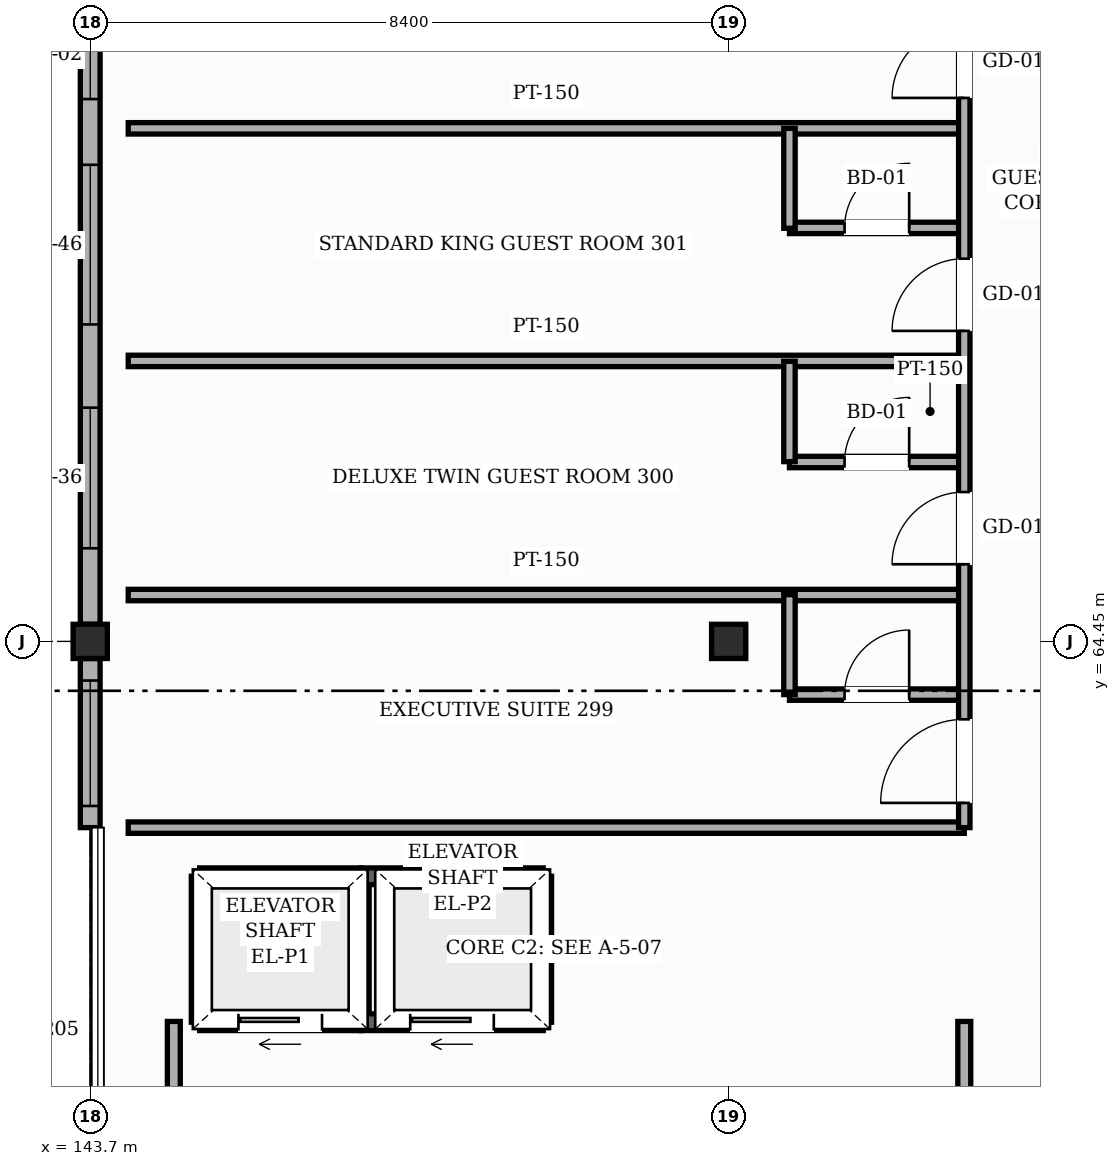
"""IFC4 building model, lengths in metres.
Left out: names, types, materials, properties, quantities, classifications, styles, units other than length and angle.
Written with IfcOpenShell. Run it as: python <this file> out.ifc"""

import sys

from ifc_helpers import new_model, si_unit, direction, frame, frame_2d, origin, origin_2d, place, context, subcontext, project, spatial, rectangle, hollow_rectangle, extrude, element, fill, save


model = new_model("IFC4")
c1 = context("Model", 3, precision=1e-05, world=origin(), true_north=direction((0.0, 1.0)))
c2 = subcontext(c1, "Body", "Model", "MODEL_VIEW")
j1 = project(units=[si_unit("LENGTHUNIT", "METRE"), si_unit("PLANEANGLEUNIT", "RADIAN")], contexts=[c1])
p1 = place(None, origin())
s1 = spatial("IfcSite", under=j1, at=p1, CompositionType="ELEMENT")
p2 = place(p1, origin())
s2 = spatial("IfcBuilding", under=s1, at=p2, CompositionType="ELEMENT")
p3 = place(p2, frame((0.0, 0.0, 42.6)))
s3 = spatial("IfcBuildingStorey", under=s2, at=p3, CompositionType="ELEMENT", Elevation=42.6)
for number, where, z_axis, x_axis in (
    (1, (143.7, 64.45, 0.0), (0.0, 0.0, 1.0), (1.0, 0.0, 0.0)),
    (2, (152.1, 64.45, 0.0), (0.0, 0.0, 1.0), (1.0, 0.0, 0.0)),
):
    element("IfcColumn", number, at=place(p3, frame(where, z_axis=z_axis, x_axis=x_axis)), inside=s3, PredefinedType="COLUMN", context=c2, shape_type="SweptSolid", body=[
        extrude(hollow_rectangle(XDim=0.45, YDim=0.45, WallThickness=0.019, InnerFilletRadius=0.019, OuterFilletRadius=0.038, at=origin_2d()), origin(), (0.0, 0.0, 1.0), 3.6),
    ])
p4 = place(p3, frame((143.7, 62.0, 0.0), z_axis=(0.0, 0.0, 1.0), x_axis=(0.0, 1.0, 0.0)))
e3 = element("IfcWall", 3, at=p4, inside=s3, PredefinedType="SOLIDWALL", context=c2, shape_type="SweptSolid", body=[
    extrude(rectangle(XDim=2.225, YDim=0.26, at=frame_2d((1.113, 0.0))), origin(), (0.0, 0.0, 1.0), 2.805),
])
p5 = place(p4, frame((0.285, 0.0, 0.85)))
e4 = element("IfcOpeningElement", 4, at=p5, cuts=e3, PredefinedType="OPENING", context=c2, shape_type="SweptSolid", body=[
    extrude(rectangle(XDim=1.65, YDim=1.35, at=frame_2d((0.825, 0.675))), frame((0.0, 0.14, 0.0), z_axis=(0.0, -1.0, 0.0), x_axis=(1.0, 0.0, 0.0)), (0.0, 0.0, 1.0), 0.28),
])
p6 = place(p3, frame((143.7, 64.675, 0.0), z_axis=(0.0, 0.0, 1.0), x_axis=(0.0, 1.0, 0.0)))
e5 = element("IfcWall", 5, at=p6, inside=s3, PredefinedType="SOLIDWALL", context=c2, shape_type="SweptSolid", body=[
    extrude(rectangle(XDim=8.45, YDim=0.26, at=frame_2d((4.225, 0.0))), origin(), (0.0, 0.0, 1.0), 2.655),
])
p7 = place(p6, frame((1.0, 0.0, 0.85)))
e6 = element("IfcOpeningElement", 6, at=p7, cuts=e5, PredefinedType="OPENING", context=c2, shape_type="SweptSolid", body=[
    extrude(rectangle(XDim=1.85, YDim=1.35, at=frame_2d((0.925, 0.675))), frame((0.0, 0.14, 0.0), z_axis=(0.0, -1.0, 0.0), x_axis=(1.0, 0.0, 0.0)), (0.0, 0.0, 1.0), 0.28),
])
p8 = place(p6, frame((3.945, 0.0, 0.85)))
e7 = element("IfcOpeningElement", 7, at=p8, cuts=e5, PredefinedType="OPENING", context=c2, shape_type="SweptSolid", body=[
    extrude(rectangle(XDim=2.1, YDim=1.35, at=frame_2d((1.05, 0.675))), frame((0.0, 0.14, 0.0), z_axis=(0.0, -1.0, 0.0), x_axis=(1.0, 0.0, 0.0)), (0.0, 0.0, 1.0), 0.28),
])
p9 = place(p6, frame((6.91, 0.0, 0.85)))
e8 = element("IfcOpeningElement", 8, at=p9, cuts=e5, PredefinedType="OPENING", context=c2, shape_type="SweptSolid", body=[
    extrude(rectangle(XDim=1.15, YDim=1.5, at=frame_2d((0.575, 0.75))), frame((0.0, 0.14, 0.0), z_axis=(0.0, -1.0, 0.0), x_axis=(1.0, 0.0, 0.0)), (0.0, 0.0, 1.0), 0.28),
])
p10 = place(p3, frame((145.14, 61.36, 0.0), z_axis=(0.0, 0.0, 1.0), x_axis=(1.0, 0.0, 0.0)))
e9 = element("IfcWall", 9, at=p10, inside=s3, PredefinedType="SHEAR", context=c2, shape_type="SweptSolid", body=[
    extrude(rectangle(XDim=2.12, YDim=0.22, at=frame_2d((1.06, 0.0))), origin(), (0.0, 0.0, 1.0), 3.38),
])
p11 = place(p3, frame((145.14, 59.44, 0.0), z_axis=(0.0, 0.0, 1.0), x_axis=(1.0, 0.0, 0.0)))
e10 = element("IfcWall", 10, at=p11, inside=s3, PredefinedType="SHEAR", context=c2, shape_type="SweptSolid", body=[
    extrude(rectangle(XDim=2.12, YDim=0.22, at=frame_2d((1.06, 0.0))), origin(), (0.0, 0.0, 1.0), 3.38),
])
p12 = place(p11, frame((0.51, 0.0, 0.0)))
e11 = element("IfcOpeningElement", 11, at=p12, cuts=e10, PredefinedType="OPENING", context=c2, shape_type="SweptSolid", body=[
    extrude(rectangle(XDim=1.1, YDim=2.2, at=frame_2d((0.55, 1.1))), frame((0.0, 0.12, 0.0), z_axis=(0.0, -1.0, 0.0), x_axis=(1.0, 0.0, 0.0)), (0.0, 0.0, 1.0), 0.24),
])
for number, where, z_axis, x_axis in (
    (12, (147.26, 59.44, 0.0), (0.0, 0.0, 1.0), (0.0, 1.0, 0.0)),
    (13, (145.14, 59.44, 0.0), (0.0, 0.0, 1.0), (0.0, 1.0, 0.0)),
):
    element("IfcWall", number, at=place(p3, frame(where, z_axis=z_axis, x_axis=x_axis)), inside=s3, PredefinedType="SHEAR", context=c2, shape_type="SweptSolid", body=[
        extrude(rectangle(XDim=1.92, YDim=0.22, at=frame_2d((0.96, 0.0))), origin(), (0.0, 0.0, 1.0), 3.38),
    ])
p13 = place(p3, frame((147.26, 61.36, 0.0), z_axis=(0.0, 0.0, 1.0), x_axis=(1.0, 0.0, 0.0)))
e14 = element("IfcWall", 14, at=p13, inside=s3, PredefinedType="SHEAR", context=c2, shape_type="SweptSolid", body=[
    extrude(rectangle(XDim=2.4, YDim=0.22, at=frame_2d((1.2, 0.0))), origin(), (0.0, 0.0, 1.0), 3.38),
])
p14 = place(p3, frame((147.26, 59.44, 0.0), z_axis=(0.0, 0.0, 1.0), x_axis=(1.0, 0.0, 0.0)))
e15 = element("IfcWall", 15, at=p14, inside=s3, PredefinedType="SHEAR", context=c2, shape_type="SweptSolid", body=[
    extrude(rectangle(XDim=2.4, YDim=0.22, at=frame_2d((1.2, 0.0))), origin(), (0.0, 0.0, 1.0), 3.38),
])
p15 = place(p14, frame((0.65, 0.0, 0.0)))
e16 = element("IfcOpeningElement", 16, at=p15, cuts=e15, PredefinedType="OPENING", context=c2, shape_type="SweptSolid", body=[
    extrude(rectangle(XDim=1.1, YDim=2.2, at=frame_2d((0.55, 1.1))), frame((0.0, 0.12, 0.0), z_axis=(0.0, -1.0, 0.0), x_axis=(1.0, 0.0, 0.0)), (0.0, 0.0, 1.0), 0.24),
])
p16 = place(p3, frame((149.66, 59.44, 0.0), z_axis=(0.0, 0.0, 1.0), x_axis=(0.0, 1.0, 0.0)))
e17 = element("IfcWall", 17, at=p16, inside=s3, PredefinedType="SHEAR", context=c2, shape_type="SweptSolid", body=[
    extrude(rectangle(XDim=1.92, YDim=0.22, at=frame_2d((0.96, 0.0))), origin(), (0.0, 0.0, 1.0), 3.38),
])
p17 = place(p3, frame((144.2, 62.0, 0.0), z_axis=(0.0, 0.0, 1.0), x_axis=(1.0, 0.0, 0.0)))
e18 = element("IfcWall", 18, at=p17, inside=s3, PredefinedType="PARTITIONING", context=c2, shape_type="SweptSolid", body=[
    extrude(rectangle(XDim=11.0, YDim=0.15, at=frame_2d((5.5, 0.0))), origin(), (0.0, 0.0, 1.0), 3.365),
])
p18 = place(p3, frame((152.9, 63.75, 0.0), z_axis=(0.0, 0.0, 1.0), x_axis=(1.0, 0.0, 0.0)))
e19 = element("IfcWall", 19, at=p18, inside=s3, PredefinedType="PARTITIONING", context=c2, shape_type="SweptSolid", body=[
    extrude(rectangle(XDim=2.3, YDim=0.15, at=frame_2d((1.15, 0.0))), origin(), (0.0, 0.0, 1.0), 3.365),
])
p19 = place(p18, frame((0.725, 0.0, 0.0)))
e20 = element("IfcOpeningElement", 20, at=p19, cuts=e19, PredefinedType="OPENING", context=c2, shape_type="SweptSolid", body=[
    extrude(rectangle(XDim=0.85, YDim=2.1, at=frame_2d((0.425, 1.05))), frame((0.0, 0.085, 0.0), z_axis=(0.0, -1.0, 0.0), x_axis=(1.0, 0.0, 0.0)), (0.0, 0.0, 1.0), 0.17),
])
p20 = place(p3, frame((144.2, 65.06, 0.0), z_axis=(0.0, 0.0, 1.0), x_axis=(1.0, 0.0, 0.0)))
e21 = element("IfcWall", 21, at=p20, inside=s3, PredefinedType="PARTITIONING", context=c2, shape_type="SweptSolid", body=[
    extrude(rectangle(XDim=11.0, YDim=0.15, at=frame_2d((5.5, 0.0))), origin(), (0.0, 0.0, 1.0), 3.365),
])
p21 = place(p3, frame((152.9, 66.81, 0.0), z_axis=(0.0, 0.0, 1.0), x_axis=(1.0, 0.0, 0.0)))
e22 = element("IfcWall", 22, at=p21, inside=s3, PredefinedType="PARTITIONING", context=c2, shape_type="SweptSolid", body=[
    extrude(rectangle(XDim=2.3, YDim=0.15, at=frame_2d((1.15, 0.0))), origin(), (0.0, 0.0, 1.0), 3.365),
])
p22 = place(p21, frame((0.725, 0.0, 0.0)))
e23 = element("IfcOpeningElement", 23, at=p22, cuts=e22, PredefinedType="OPENING", context=c2, shape_type="SweptSolid", body=[
    extrude(rectangle(XDim=0.85, YDim=2.1, at=frame_2d((0.425, 1.05))), frame((0.0, 0.085, 0.0), z_axis=(0.0, -1.0, 0.0), x_axis=(1.0, 0.0, 0.0)), (0.0, 0.0, 1.0), 0.17),
])
p23 = place(p3, frame((144.2, 68.14, 0.0), z_axis=(0.0, 0.0, 1.0), x_axis=(1.0, 0.0, 0.0)))
e24 = element("IfcWall", 24, at=p23, inside=s3, PredefinedType="PARTITIONING", context=c2, shape_type="SweptSolid", body=[
    extrude(rectangle(XDim=11.0, YDim=0.15, at=frame_2d((5.5, 0.0))), origin(), (0.0, 0.0, 1.0), 3.365),
])
p24 = place(p3, frame((152.9, 69.89, 0.0), z_axis=(0.0, 0.0, 1.0), x_axis=(1.0, 0.0, 0.0)))
e25 = element("IfcWall", 25, at=p24, inside=s3, PredefinedType="PARTITIONING", context=c2, shape_type="SweptSolid", body=[
    extrude(rectangle(XDim=2.3, YDim=0.15, at=frame_2d((1.15, 0.0))), origin(), (0.0, 0.0, 1.0), 3.365),
])
p25 = place(p24, frame((0.725, 0.0, 0.0)))
e26 = element("IfcOpeningElement", 26, at=p25, cuts=e25, PredefinedType="OPENING", context=c2, shape_type="SweptSolid", body=[
    extrude(rectangle(XDim=0.85, YDim=2.1, at=frame_2d((0.425, 1.05))), frame((0.0, 0.085, 0.0), z_axis=(0.0, -1.0, 0.0), x_axis=(1.0, 0.0, 0.0)), (0.0, 0.0, 1.0), 0.17),
])
p26 = place(p3, frame((144.2, 71.2, 0.0), z_axis=(0.0, 0.0, 1.0), x_axis=(1.0, 0.0, 0.0)))
e27 = element("IfcWall", 27, at=p26, inside=s3, PredefinedType="PARTITIONING", context=c2, shape_type="SweptSolid", body=[
    extrude(rectangle(XDim=11.0, YDim=0.15, at=frame_2d((5.5, 0.0))), origin(), (0.0, 0.0, 1.0), 3.365),
])
p27 = place(p3, frame((144.8, 53.0, 0.0), z_axis=(0.0, 0.0, 1.0), x_axis=(0.0, 1.0, 0.0)))
e28 = element("IfcWall", 28, at=p27, inside=s3, PredefinedType="PARTITIONING", context=c2, shape_type="SweptSolid", body=[
    extrude(rectangle(XDim=6.45, YDim=0.17, at=frame_2d((3.225, 0.0))), origin(), (0.0, 0.0, 1.0), 3.365),
])
p28 = place(p3, frame((152.9, 63.75, 0.0), z_axis=(0.0, 0.0, 1.0), x_axis=(0.0, 1.0, 0.0)))
e29 = element("IfcWall", 29, at=p28, inside=s3, PredefinedType="PARTITIONING", context=c2, shape_type="SweptSolid", body=[
    extrude(rectangle(XDim=1.315, YDim=0.15, at=frame_2d((0.657, 0.0))), origin(), (0.0, 0.0, 1.0), 3.365),
])
p29 = place(p3, frame((152.9, 66.815, 0.0), z_axis=(0.0, 0.0, 1.0), x_axis=(0.0, 1.0, 0.0)))
e30 = element("IfcWall", 30, at=p29, inside=s3, PredefinedType="PARTITIONING", context=c2, shape_type="SweptSolid", body=[
    extrude(rectangle(XDim=1.32, YDim=0.15, at=frame_2d((0.66, 0.0))), origin(), (0.0, 0.0, 1.0), 3.365),
])
p30 = place(p3, frame((152.9, 69.885, 0.0), z_axis=(0.0, 0.0, 1.0), x_axis=(0.0, 1.0, 0.0)))
e31 = element("IfcWall", 31, at=p30, inside=s3, PredefinedType="PARTITIONING", context=c2, shape_type="SweptSolid", body=[
    extrude(rectangle(XDim=1.315, YDim=0.15, at=frame_2d((0.657, 0.0))), origin(), (0.0, 0.0, 1.0), 3.365),
])
p31 = place(p3, frame((155.2, 53.0, 0.0), z_axis=(0.0, 0.0, 1.0), x_axis=(0.0, 1.0, 0.0)))
e32 = element("IfcWall", 32, at=p31, inside=s3, PredefinedType="PARTITIONING", context=c2, shape_type="SweptSolid", body=[
    extrude(rectangle(XDim=6.45, YDim=0.17, at=frame_2d((3.225, 0.0))), origin(), (0.0, 0.0, 1.0), 3.365),
])
p32 = place(p31, frame((2.625, 0.0, 0.0)))
e33 = element("IfcOpeningElement", 33, at=p32, cuts=e32, PredefinedType="OPENING", context=c2, shape_type="SweptSolid", body=[
    extrude(rectangle(XDim=1.2, YDim=2.2, at=frame_2d((0.6, 1.1))), frame((0.0, 0.095, 0.0), z_axis=(0.0, -1.0, 0.0), x_axis=(1.0, 0.0, 0.0)), (0.0, 0.0, 1.0), 0.19),
])
p33 = place(p3, frame((155.2, 62.0, 0.0), z_axis=(0.0, 0.0, 1.0), x_axis=(0.0, 1.0, 0.0)))
e34 = element("IfcWall", 34, at=p33, inside=s3, PredefinedType="PARTITIONING", context=c2, shape_type="SweptSolid", body=[
    extrude(rectangle(XDim=18.4, YDim=0.15, at=frame_2d((9.2, 0.0))), origin(), (0.0, 0.0, 1.0), 3.365),
])
p34 = place(p33, frame((0.325, 0.0, 0.0)))
e35 = element("IfcOpeningElement", 35, at=p34, cuts=e34, PredefinedType="OPENING", context=c2, shape_type="SweptSolid", body=[
    extrude(rectangle(XDim=1.1, YDim=2.2, at=frame_2d((0.55, 1.1))), frame((0.0, 0.085, 0.0), z_axis=(0.0, -1.0, 0.0), x_axis=(1.0, 0.0, 0.0)), (0.0, 0.0, 1.0), 0.17),
])
p35 = place(p33, frame((3.465, 0.0, 0.0)))
e36 = element("IfcOpeningElement", 36, at=p35, cuts=e34, PredefinedType="OPENING", context=c2, shape_type="SweptSolid", body=[
    extrude(rectangle(XDim=0.95, YDim=2.15, at=frame_2d((0.475, 1.075))), frame((0.0, 0.085, 0.0), z_axis=(0.0, -1.0, 0.0), x_axis=(1.0, 0.0, 0.0)), (0.0, 0.0, 1.0), 0.17),
])
p36 = place(p33, frame((6.535, 0.0, 0.0)))
e37 = element("IfcOpeningElement", 37, at=p36, cuts=e34, PredefinedType="OPENING", context=c2, shape_type="SweptSolid", body=[
    extrude(rectangle(XDim=0.95, YDim=2.15, at=frame_2d((0.475, 1.075))), frame((0.0, 0.085, 0.0), z_axis=(0.0, -1.0, 0.0), x_axis=(1.0, 0.0, 0.0)), (0.0, 0.0, 1.0), 0.17),
])
p37 = place(p33, frame((9.6, 0.0, 0.0)))
e38 = element("IfcOpeningElement", 38, at=p37, cuts=e34, PredefinedType="OPENING", context=c2, shape_type="SweptSolid", body=[
    extrude(rectangle(XDim=0.95, YDim=2.15, at=frame_2d((0.475, 1.075))), frame((0.0, 0.085, 0.0), z_axis=(0.0, -1.0, 0.0), x_axis=(1.0, 0.0, 0.0)), (0.0, 0.0, 1.0), 0.17),
])
p38 = place(p33, frame((12.665, 0.0, 0.0)))
e39 = element("IfcOpeningElement", 39, at=p38, cuts=e34, PredefinedType="OPENING", context=c2, shape_type="SweptSolid", body=[
    extrude(rectangle(XDim=0.95, YDim=2.15, at=frame_2d((0.475, 1.075))), frame((0.0, 0.085, 0.0), z_axis=(0.0, -1.0, 0.0), x_axis=(1.0, 0.0, 0.0)), (0.0, 0.0, 1.0), 0.17),
])
p39 = place(p33, frame((15.735, 0.0, 0.0)))
e40 = element("IfcOpeningElement", 40, at=p39, cuts=e34, PredefinedType="OPENING", context=c2, shape_type="SweptSolid", body=[
    extrude(rectangle(XDim=0.95, YDim=2.15, at=frame_2d((0.475, 1.075))), frame((0.0, 0.085, 0.0), z_axis=(0.0, -1.0, 0.0), x_axis=(1.0, 0.0, 0.0)), (0.0, 0.0, 1.0), 0.17),
])
p40 = place(p5, origin())
e41 = element("IfcWindow", 41, at=p40, inside=s3, PartitioningType="SINGLE_PANEL", PredefinedType="WINDOW", context=c2, shape_type="SweptSolid", body=[
    extrude(rectangle(XDim=1.65, YDim=1.35, at=frame_2d((0.825, 0.675))), frame((0.0, 0.03, 0.0), z_axis=(0.0, -1.0, 0.0), x_axis=(1.0, 0.0, 0.0)), (0.0, 0.0, 1.0), 0.06),
])
fill(e4, e41)
p41 = place(p7, origin())
e42 = element("IfcWindow", 42, at=p41, inside=s3, PartitioningType="SINGLE_PANEL", PredefinedType="WINDOW", context=c2, shape_type="SweptSolid", body=[
    extrude(rectangle(XDim=1.85, YDim=1.35, at=frame_2d((0.925, 0.675))), frame((0.0, 0.03, 0.0), z_axis=(0.0, -1.0, 0.0), x_axis=(1.0, 0.0, 0.0)), (0.0, 0.0, 1.0), 0.06),
])
fill(e6, e42)
p42 = place(p8, origin())
e43 = element("IfcWindow", 43, at=p42, inside=s3, PartitioningType="SINGLE_PANEL", PredefinedType="WINDOW", context=c2, shape_type="SweptSolid", body=[
    extrude(rectangle(XDim=2.1, YDim=1.35, at=frame_2d((1.05, 0.675))), frame((0.0, 0.03, 0.0), z_axis=(0.0, -1.0, 0.0), x_axis=(1.0, 0.0, 0.0)), (0.0, 0.0, 1.0), 0.06),
])
fill(e7, e43)
p43 = place(p9, origin())
e44 = element("IfcWindow", 44, at=p43, inside=s3, PartitioningType="SINGLE_PANEL", PredefinedType="WINDOW", context=c2, shape_type="SweptSolid", body=[
    extrude(rectangle(XDim=1.15, YDim=1.5, at=frame_2d((0.575, 0.75))), frame((0.0, 0.03, 0.0), z_axis=(0.0, -1.0, 0.0), x_axis=(1.0, 0.0, 0.0)), (0.0, 0.0, 1.0), 0.06),
])
fill(e8, e44)
p44 = place(p12, origin())
e45 = element("IfcDoor", 45, at=p44, inside=s3, OperationType="SLIDING_TO_LEFT", PredefinedType="DOOR", context=c2, shape_type="SweptSolid", body=[
    extrude(rectangle(XDim=1.1, YDim=2.2, at=frame_2d((0.55, 1.1))), frame((0.0, 0.025, 0.0), z_axis=(0.0, -1.0, 0.0), x_axis=(1.0, 0.0, 0.0)), (0.0, 0.0, 1.0), 0.05),
])
fill(e11, e45)
p45 = place(p15, origin())
e46 = element("IfcDoor", 46, at=p45, inside=s3, OperationType="SLIDING_TO_LEFT", PredefinedType="DOOR", context=c2, shape_type="SweptSolid", body=[
    extrude(rectangle(XDim=1.1, YDim=2.2, at=frame_2d((0.55, 1.1))), frame((0.0, 0.025, 0.0), z_axis=(0.0, -1.0, 0.0), x_axis=(1.0, 0.0, 0.0)), (0.0, 0.0, 1.0), 0.05),
])
fill(e16, e46)
p46 = place(p34, origin())
e47 = element("IfcDoor", 47, at=p46, inside=s3, OperationType="SINGLE_SWING_LEFT", PredefinedType="DOOR", context=c2, shape_type="SweptSolid", body=[
    extrude(rectangle(XDim=1.1, YDim=2.2, at=frame_2d((0.55, 1.1))), frame((0.0, 0.025, 0.0), z_axis=(0.0, -1.0, 0.0), x_axis=(1.0, 0.0, 0.0)), (0.0, 0.0, 1.0), 0.05),
])
fill(e35, e47)
p47 = place(p19, origin())
e48 = element("IfcDoor", 48, at=p47, inside=s3, OperationType="SINGLE_SWING_RIGHT", PredefinedType="DOOR", context=c2, shape_type="SweptSolid", body=[
    extrude(rectangle(XDim=0.85, YDim=2.1, at=frame_2d((0.425, 1.05))), frame((0.0, 0.025, 0.0), z_axis=(0.0, -1.0, 0.0), x_axis=(1.0, 0.0, 0.0)), (0.0, 0.0, 1.0), 0.05),
])
fill(e20, e48)
p48 = place(p35, origin())
e49 = element("IfcDoor", 49, at=p48, inside=s3, OperationType="SINGLE_SWING_LEFT", PredefinedType="DOOR", context=c2, shape_type="SweptSolid", body=[
    extrude(rectangle(XDim=0.95, YDim=2.15, at=frame_2d((0.475, 1.075))), frame((0.0, 0.025, 0.0), z_axis=(0.0, -1.0, 0.0), x_axis=(1.0, 0.0, 0.0)), (0.0, 0.0, 1.0), 0.05),
])
fill(e36, e49)
p49 = place(p22, origin())
e50 = element("IfcDoor", 50, at=p49, inside=s3, OperationType="SINGLE_SWING_RIGHT", PredefinedType="DOOR", context=c2, shape_type="SweptSolid", body=[
    extrude(rectangle(XDim=0.85, YDim=2.1, at=frame_2d((0.425, 1.05))), frame((0.0, 0.025, 0.0), z_axis=(0.0, -1.0, 0.0), x_axis=(1.0, 0.0, 0.0)), (0.0, 0.0, 1.0), 0.05),
])
fill(e23, e50)
p50 = place(p36, origin())
e51 = element("IfcDoor", 51, at=p50, inside=s3, OperationType="SINGLE_SWING_LEFT", PredefinedType="DOOR", context=c2, shape_type="SweptSolid", body=[
    extrude(rectangle(XDim=0.95, YDim=2.15, at=frame_2d((0.475, 1.075))), frame((0.0, 0.025, 0.0), z_axis=(0.0, -1.0, 0.0), x_axis=(1.0, 0.0, 0.0)), (0.0, 0.0, 1.0), 0.05),
])
fill(e37, e51)
p51 = place(p25, origin())
e52 = element("IfcDoor", 52, at=p51, inside=s3, OperationType="SINGLE_SWING_RIGHT", PredefinedType="DOOR", context=c2, shape_type="SweptSolid", body=[
    extrude(rectangle(XDim=0.85, YDim=2.1, at=frame_2d((0.425, 1.05))), frame((0.0, 0.025, 0.0), z_axis=(0.0, -1.0, 0.0), x_axis=(1.0, 0.0, 0.0)), (0.0, 0.0, 1.0), 0.05),
])
fill(e26, e52)
p52 = place(p37, origin())
e53 = element("IfcDoor", 53, at=p52, inside=s3, OperationType="SINGLE_SWING_LEFT", PredefinedType="DOOR", context=c2, shape_type="SweptSolid", body=[
    extrude(rectangle(XDim=0.95, YDim=2.15, at=frame_2d((0.475, 1.075))), frame((0.0, 0.025, 0.0), z_axis=(0.0, -1.0, 0.0), x_axis=(1.0, 0.0, 0.0)), (0.0, 0.0, 1.0), 0.05),
])
fill(e38, e53)
save(model, sys.argv[1])
